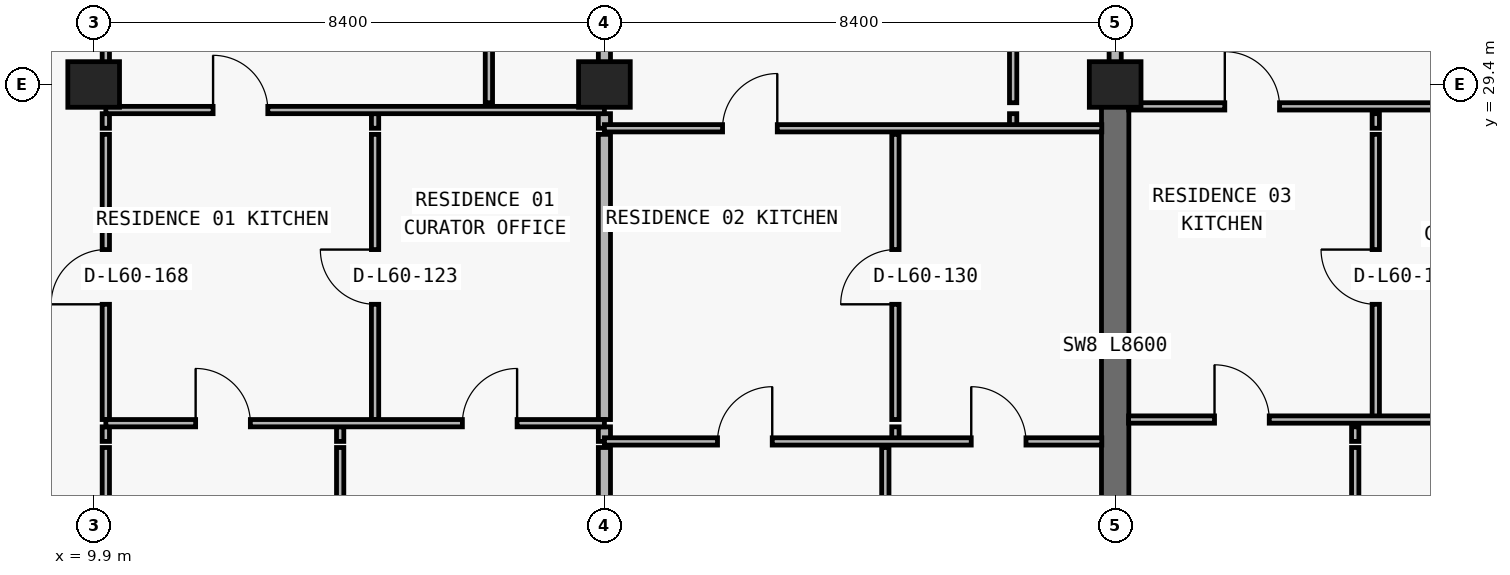
"""IFC4 building model, lengths in metres.
Left out: names, types, materials, properties, quantities, classifications, styles, units other than length and angle.
Written with IfcOpenShell. Run it as: python <this file> out.ifc"""

import sys

from ifc_helpers import new_model, si_unit, direction, frame, frame_2d, origin, origin_2d, place, context, subcontext, project, spatial, rectangle, extrude, element, fill, save


model = new_model("IFC4")
c1 = context("Model", 3, precision=1e-05, world=origin(), true_north=direction((0.0, 1.0)))
c2 = subcontext(c1, "Body", "Model", "MODEL_VIEW")
j1 = project(units=[si_unit("LENGTHUNIT", "METRE"), si_unit("PLANEANGLEUNIT", "RADIAN")], contexts=[c1])
p1 = place(None, origin())
s1 = spatial("IfcSite", under=j1, at=p1, CompositionType="ELEMENT")
p2 = place(p1, origin())
s2 = spatial("IfcBuilding", under=s1, at=p2, CompositionType="ELEMENT")
p3 = place(p2, frame((0.0, 0.0, 214.8)))
s3 = spatial("IfcBuildingStorey", under=s2, at=p3, CompositionType="ELEMENT", Elevation=214.8)
for number, where, z_axis, x_axis in (
    (1, (9.9, 29.4, 0.0), (0.0, 0.0, 1.0), (1.0, 0.0, 0.0)),
    (2, (18.3, 29.4, 0.0), (0.0, 0.0, 1.0), (1.0, 0.0, 0.0)),
    (3, (26.7, 29.4, 0.0), (0.0, 0.0, 1.0), (1.0, 0.0, 0.0)),
):
    element("IfcColumn", number, at=place(p3, frame(where, z_axis=z_axis, x_axis=x_axis)), inside=s3, PredefinedType="COLUMN", context=c2, shape_type="SweptSolid", body=[
        extrude(rectangle(XDim=0.85, YDim=0.75, at=origin_2d()), origin(), (0.0, 0.0, 1.0), 3.05),
    ])
p4 = place(p3, frame((26.7, 20.8, 0.0), z_axis=(0.0, 0.0, 1.0), x_axis=(0.0, 1.0, 0.0)))
e4 = element("IfcWall", 4, at=p4, inside=s3, PredefinedType="SHEAR", context=c2, shape_type="SweptSolid", body=[
    extrude(rectangle(XDim=8.6, YDim=0.45, at=frame_2d((4.3, 0.0))), origin(), (0.0, 0.0, 1.0), 3.05),
])
p5 = place(p3, frame((10.1, 11.285, 0.0), z_axis=(0.0, 0.0, 1.0), x_axis=(0.0, 1.0, 0.0)))
e5 = element("IfcWall", 5, at=p5, inside=s3, PredefinedType="PARTITIONING", context=c2, shape_type="SweptSolid", body=[
    extrude(rectangle(XDim=12.145, YDim=0.12, at=frame_2d((6.073, 0.0))), origin(), (0.0, 0.0, 1.0), 2.263),
])
p6 = place(p3, frame((10.1, 23.53, 0.0), z_axis=(0.0, 0.0, 1.0), x_axis=(0.0, 1.0, 0.0)))
e6 = element("IfcWall", 6, at=p6, inside=s3, PredefinedType="PARTITIONING", context=c2, shape_type="SweptSolid", body=[
    extrude(rectangle(XDim=0.24, YDim=0.12, at=frame_2d((0.12, 0.0))), origin(), (0.0, 0.0, 1.0), 2.263),
])
p7 = place(p3, frame((10.1, 23.89, 0.0), z_axis=(0.0, 0.0, 1.0), x_axis=(0.0, 1.0, 0.0)))
e7 = element("IfcWall", 7, at=p7, inside=s3, PredefinedType="PARTITIONING", context=c2, shape_type="SweptSolid", body=[
    extrude(rectangle(XDim=4.69, YDim=0.12, at=frame_2d((2.345, 0.0))), origin(), (0.0, 0.0, 1.0), 2.263),
])
p8 = place(p7, frame((1.895, 0.0, 0.0)))
e8 = element("IfcOpeningElement", 8, at=p8, cuts=e7, PredefinedType="OPENING", context=c2, shape_type="SweptSolid", body=[
    extrude(rectangle(XDim=0.9, YDim=2.15, at=frame_2d((0.45, 1.075))), frame((0.0, 0.07, 0.0), z_axis=(0.0, -1.0, 0.0), x_axis=(1.0, 0.0, 0.0)), (0.0, 0.0, 1.0), 0.14),
])
p9 = place(p3, frame((10.1, 28.68, 0.0), z_axis=(0.0, 0.0, 1.0), x_axis=(0.0, 1.0, 0.0)))
e9 = element("IfcWall", 9, at=p9, inside=s3, PredefinedType="PARTITIONING", context=c2, shape_type="SweptSolid", body=[
    extrude(rectangle(XDim=0.24, YDim=0.12, at=frame_2d((0.12, 0.0))), origin(), (0.0, 0.0, 1.0), 2.263),
])
p10 = place(p3, frame((10.1, 29.1, 0.0), z_axis=(0.0, 0.0, 1.0), x_axis=(0.0, 1.0, 0.0)))
e10 = element("IfcWall", 10, at=p10, inside=s3, PredefinedType="PARTITIONING", context=c2, shape_type="SweptSolid", body=[
    extrude(rectangle(XDim=5.3, YDim=0.12, at=frame_2d((2.65, 0.0))), origin(), (0.0, 0.0, 1.0), 2.263),
])
p11 = place(p3, frame((13.954, 11.24, 0.0), z_axis=(0.0, 0.0, 1.0), x_axis=(0.0, 1.0, 0.0)))
e11 = element("IfcWall", 11, at=p11, inside=s3, PredefinedType="PARTITIONING", context=c2, shape_type="SweptSolid", body=[
    extrude(rectangle(XDim=12.19, YDim=0.12, at=frame_2d((6.095, 0.0))), origin(), (0.0, 0.0, 1.0), 3.05),
])
p12 = place(p3, frame((13.954, 23.53, 0.0), z_axis=(0.0, 0.0, 1.0), x_axis=(0.0, 1.0, 0.0)))
e12 = element("IfcWall", 12, at=p12, inside=s3, PredefinedType="PARTITIONING", context=c2, shape_type="SweptSolid", body=[
    extrude(rectangle(XDim=0.24, YDim=0.12, at=frame_2d((0.12, 0.0))), origin(), (0.0, 0.0, 1.0), 3.05),
])
p13 = place(p3, frame((14.528, 23.89, 0.0), z_axis=(0.0, 0.0, 1.0), x_axis=(0.0, 1.0, 0.0)))
e13 = element("IfcWall", 13, at=p13, inside=s3, PredefinedType="PARTITIONING", context=c2, shape_type="SweptSolid", body=[
    extrude(rectangle(XDim=4.69, YDim=0.12, at=frame_2d((2.345, 0.0))), origin(), (0.0, 0.0, 1.0), 3.05),
])
p14 = place(p13, frame((1.895, 0.0, 0.0)))
e14 = element("IfcOpeningElement", 14, at=p14, cuts=e13, PredefinedType="OPENING", context=c2, shape_type="SweptSolid", body=[
    extrude(rectangle(XDim=0.9, YDim=2.15, at=frame_2d((0.45, 1.075))), frame((0.0, 0.07, 0.0), z_axis=(0.0, -1.0, 0.0), x_axis=(1.0, 0.0, 0.0)), (0.0, 0.0, 1.0), 0.14),
])
p15 = place(p3, frame((14.528, 28.68, 0.0), z_axis=(0.0, 0.0, 1.0), x_axis=(0.0, 1.0, 0.0)))
e15 = element("IfcWall", 15, at=p15, inside=s3, PredefinedType="PARTITIONING", context=c2, shape_type="SweptSolid", body=[
    extrude(rectangle(XDim=0.24, YDim=0.12, at=frame_2d((0.12, 0.0))), origin(), (0.0, 0.0, 1.0), 3.05),
])
p16 = place(p3, frame((16.4, 29.1, 0.0), z_axis=(0.0, 0.0, 1.0), x_axis=(0.0, 1.0, 0.0)))
e16 = element("IfcWall", 16, at=p16, inside=s3, PredefinedType="PARTITIONING", context=c2, shape_type="SweptSolid", body=[
    extrude(rectangle(XDim=5.3, YDim=0.12, at=frame_2d((2.65, 0.0))), origin(), (0.0, 0.0, 1.0), 3.05),
])
p17 = place(p16, frame((2.225, 0.0, 0.0)))
e17 = element("IfcOpeningElement", 17, at=p17, cuts=e16, PredefinedType="OPENING", context=c2, shape_type="SweptSolid", body=[
    extrude(rectangle(XDim=0.85, YDim=2.1, at=frame_2d((0.425, 1.05))), frame((0.0, 0.07, 0.0), z_axis=(0.0, -1.0, 0.0), x_axis=(1.0, 0.0, 0.0)), (0.0, 0.0, 1.0), 0.14),
])
p18 = place(p3, frame((18.3, 11.24, 0.0), z_axis=(0.0, 0.0, 1.0), x_axis=(0.0, 1.0, 0.0)))
e18 = element("IfcWall", 18, at=p18, inside=s3, PredefinedType="PARTITIONING", context=c2, shape_type="SweptSolid", body=[
    extrude(rectangle(XDim=12.19, YDim=0.2, at=frame_2d((6.095, 0.0))), origin(), (0.0, 0.0, 1.0), 2.263),
])
p19 = place(p3, frame((18.3, 23.53, 0.0), z_axis=(0.0, 0.0, 1.0), x_axis=(0.0, 1.0, 0.0)))
e19 = element("IfcWall", 19, at=p19, inside=s3, PredefinedType="PARTITIONING", context=c2, shape_type="SweptSolid", body=[
    extrude(rectangle(XDim=0.24, YDim=0.2, at=frame_2d((0.12, 0.0))), origin(), (0.0, 0.0, 1.0), 2.263),
])
p20 = place(p3, frame((18.3, 23.89, 0.0), z_axis=(0.0, 0.0, 1.0), x_axis=(0.0, 1.0, 0.0)))
e20 = element("IfcWall", 20, at=p20, inside=s3, PredefinedType="PARTITIONING", context=c2, shape_type="SweptSolid", body=[
    extrude(rectangle(XDim=4.69, YDim=0.2, at=frame_2d((2.345, 0.0))), origin(), (0.0, 0.0, 1.0), 2.263),
])
p21 = place(p3, frame((18.3, 28.68, 0.0), z_axis=(0.0, 0.0, 1.0), x_axis=(0.0, 1.0, 0.0)))
e21 = element("IfcWall", 21, at=p21, inside=s3, PredefinedType="PARTITIONING", context=c2, shape_type="SweptSolid", body=[
    extrude(rectangle(XDim=0.24, YDim=0.2, at=frame_2d((0.12, 0.0))), origin(), (0.0, 0.0, 1.0), 2.263),
])
p22 = place(p3, frame((18.3, 29.1, 0.0), z_axis=(0.0, 0.0, 1.0), x_axis=(0.0, 1.0, 0.0)))
e22 = element("IfcWall", 22, at=p22, inside=s3, PredefinedType="PARTITIONING", context=c2, shape_type="SweptSolid", body=[
    extrude(rectangle(XDim=5.3, YDim=0.2, at=frame_2d((2.65, 0.0))), origin(), (0.0, 0.0, 1.0), 2.263),
])
p23 = place(p3, frame((22.92, 11.24, 0.0), z_axis=(0.0, 0.0, 1.0), x_axis=(0.0, 1.0, 0.0)))
e23 = element("IfcWall", 23, at=p23, inside=s3, PredefinedType="PARTITIONING", context=c2, shape_type="SweptSolid", body=[
    extrude(rectangle(XDim=12.19, YDim=0.12, at=frame_2d((6.095, 0.0))), origin(), (0.0, 0.0, 1.0), 3.05),
])
p24 = place(p3, frame((23.086, 23.53, 0.0), z_axis=(0.0, 0.0, 1.0), x_axis=(0.0, 1.0, 0.0)))
e24 = element("IfcWall", 24, at=p24, inside=s3, PredefinedType="PARTITIONING", context=c2, shape_type="SweptSolid", body=[
    extrude(rectangle(XDim=0.24, YDim=0.12, at=frame_2d((0.12, 0.0))), origin(), (0.0, 0.0, 1.0), 3.05),
])
p25 = place(p3, frame((23.086, 23.89, 0.0), z_axis=(0.0, 0.0, 1.0), x_axis=(0.0, 1.0, 0.0)))
e25 = element("IfcWall", 25, at=p25, inside=s3, PredefinedType="PARTITIONING", context=c2, shape_type="SweptSolid", body=[
    extrude(rectangle(XDim=4.69, YDim=0.12, at=frame_2d((2.345, 0.0))), origin(), (0.0, 0.0, 1.0), 3.05),
])
p26 = place(p25, frame((1.895, 0.0, 0.0)))
e26 = element("IfcOpeningElement", 26, at=p26, cuts=e25, PredefinedType="OPENING", context=c2, shape_type="SweptSolid", body=[
    extrude(rectangle(XDim=0.9, YDim=2.15, at=frame_2d((0.45, 1.075))), frame((0.0, 0.07, 0.0), z_axis=(0.0, -1.0, 0.0), x_axis=(1.0, 0.0, 0.0)), (0.0, 0.0, 1.0), 0.14),
])
p27 = place(p3, frame((25.022, 28.68, 0.0), z_axis=(0.0, 0.0, 1.0), x_axis=(0.0, 1.0, 0.0)))
e27 = element("IfcWall", 27, at=p27, inside=s3, PredefinedType="PARTITIONING", context=c2, shape_type="SweptSolid", body=[
    extrude(rectangle(XDim=0.24, YDim=0.12, at=frame_2d((0.12, 0.0))), origin(), (0.0, 0.0, 1.0), 3.05),
])
p28 = place(p3, frame((25.022, 29.1, 0.0), z_axis=(0.0, 0.0, 1.0), x_axis=(0.0, 1.0, 0.0)))
e28 = element("IfcWall", 28, at=p28, inside=s3, PredefinedType="PARTITIONING", context=c2, shape_type="SweptSolid", body=[
    extrude(rectangle(XDim=5.3, YDim=0.12, at=frame_2d((2.65, 0.0))), origin(), (0.0, 0.0, 1.0), 3.05),
])
p29 = place(p28, frame((2.225, 0.0, 0.0)))
e29 = element("IfcOpeningElement", 29, at=p29, cuts=e28, PredefinedType="OPENING", context=c2, shape_type="SweptSolid", body=[
    extrude(rectangle(XDim=0.85, YDim=2.1, at=frame_2d((0.425, 1.05))), frame((0.0, 0.07, 0.0), z_axis=(0.0, -1.0, 0.0), x_axis=(1.0, 0.0, 0.0)), (0.0, 0.0, 1.0), 0.14),
])
p30 = place(p3, frame((26.7, 29.405, 0.0), z_axis=(0.0, 0.0, 1.0), x_axis=(0.0, 1.0, 0.0)))
e30 = element("IfcWall", 30, at=p30, inside=s3, PredefinedType="PARTITIONING", context=c2, shape_type="SweptSolid", body=[
    extrude(rectangle(XDim=4.995, YDim=0.2, at=frame_2d((2.498, 0.0))), origin(), (0.0, 0.0, 1.0), 2.335),
])
p31 = place(p3, frame((30.648, 11.24, 0.0), z_axis=(0.0, 0.0, 1.0), x_axis=(0.0, 1.0, 0.0)))
e31 = element("IfcWall", 31, at=p31, inside=s3, PredefinedType="PARTITIONING", context=c2, shape_type="SweptSolid", body=[
    extrude(rectangle(XDim=12.19, YDim=0.12, at=frame_2d((6.095, 0.0))), origin(), (0.0, 0.0, 1.0), 3.05),
])
p32 = place(p3, frame((30.648, 23.53, 0.0), z_axis=(0.0, 0.0, 1.0), x_axis=(0.0, 1.0, 0.0)))
e32 = element("IfcWall", 32, at=p32, inside=s3, PredefinedType="PARTITIONING", context=c2, shape_type="SweptSolid", body=[
    extrude(rectangle(XDim=0.24, YDim=0.12, at=frame_2d((0.12, 0.0))), origin(), (0.0, 0.0, 1.0), 3.05),
])
p33 = place(p3, frame((30.986, 23.89, 0.0), z_axis=(0.0, 0.0, 1.0), x_axis=(0.0, 1.0, 0.0)))
e33 = element("IfcWall", 33, at=p33, inside=s3, PredefinedType="PARTITIONING", context=c2, shape_type="SweptSolid", body=[
    extrude(rectangle(XDim=4.69, YDim=0.12, at=frame_2d((2.345, 0.0))), origin(), (0.0, 0.0, 1.0), 3.05),
])
p34 = place(p33, frame((1.895, 0.0, 0.0)))
e34 = element("IfcOpeningElement", 34, at=p34, cuts=e33, PredefinedType="OPENING", context=c2, shape_type="SweptSolid", body=[
    extrude(rectangle(XDim=0.9, YDim=2.15, at=frame_2d((0.45, 1.075))), frame((0.0, 0.07, 0.0), z_axis=(0.0, -1.0, 0.0), x_axis=(1.0, 0.0, 0.0)), (0.0, 0.0, 1.0), 0.14),
])
p35 = place(p3, frame((30.986, 28.68, 0.0), z_axis=(0.0, 0.0, 1.0), x_axis=(0.0, 1.0, 0.0)))
e35 = element("IfcWall", 35, at=p35, inside=s3, PredefinedType="PARTITIONING", context=c2, shape_type="SweptSolid", body=[
    extrude(rectangle(XDim=0.24, YDim=0.12, at=frame_2d((0.12, 0.0))), origin(), (0.0, 0.0, 1.0), 3.05),
])
p36 = place(p3, frame((18.3, 23.53, 0.0), z_axis=(0.0, 0.0, 1.0), x_axis=(1.0, 0.0, 0.0)))
e36 = element("IfcWall", 36, at=p36, inside=s3, PredefinedType="PARTITIONING", context=c2, shape_type="SweptSolid", body=[
    extrude(rectangle(XDim=8.18, YDim=0.12, at=frame_2d((4.09, 0.0))), origin(), (0.0, 0.0, 1.0), 3.05),
])
p37 = place(p36, frame((1.86, 0.0, 0.0)))
e37 = element("IfcOpeningElement", 37, at=p37, cuts=e36, PredefinedType="OPENING", context=c2, shape_type="SweptSolid", body=[
    extrude(rectangle(XDim=0.9, YDim=2.15, at=frame_2d((0.45, 1.075))), frame((0.0, 0.07, 0.0), z_axis=(0.0, -1.0, 0.0), x_axis=(1.0, 0.0, 0.0)), (0.0, 0.0, 1.0), 0.14),
])
p38 = place(p36, frame((6.033, 0.0, 0.0)))
e38 = element("IfcOpeningElement", 38, at=p38, cuts=e36, PredefinedType="OPENING", context=c2, shape_type="SweptSolid", body=[
    extrude(rectangle(XDim=0.9, YDim=2.15, at=frame_2d((0.45, 1.075))), frame((0.0, 0.07, 0.0), z_axis=(0.0, -1.0, 0.0), x_axis=(1.0, 0.0, 0.0)), (0.0, 0.0, 1.0), 0.14),
])
p39 = place(p3, frame((10.1, 23.83, 0.0), z_axis=(0.0, 0.0, 1.0), x_axis=(1.0, 0.0, 0.0)))
e39 = element("IfcWall", 39, at=p39, inside=s3, PredefinedType="PARTITIONING", context=c2, shape_type="SweptSolid", body=[
    extrude(rectangle(XDim=8.2, YDim=0.12, at=frame_2d((4.1, 0.0))), origin(), (0.0, 0.0, 1.0), 3.05),
])
p40 = place(p39, frame((1.477, 0.0, 0.0)))
e40 = element("IfcOpeningElement", 40, at=p40, cuts=e39, PredefinedType="OPENING", context=c2, shape_type="SweptSolid", body=[
    extrude(rectangle(XDim=0.9, YDim=2.15, at=frame_2d((0.45, 1.075))), frame((0.0, 0.07, 0.0), z_axis=(0.0, -1.0, 0.0), x_axis=(1.0, 0.0, 0.0)), (0.0, 0.0, 1.0), 0.14),
])
p41 = place(p39, frame((5.864, 0.0, 0.0)))
e41 = element("IfcOpeningElement", 41, at=p41, cuts=e39, PredefinedType="OPENING", context=c2, shape_type="SweptSolid", body=[
    extrude(rectangle(XDim=0.9, YDim=2.15, at=frame_2d((0.45, 1.075))), frame((0.0, 0.07, 0.0), z_axis=(0.0, -1.0, 0.0), x_axis=(1.0, 0.0, 0.0)), (0.0, 0.0, 1.0), 0.14),
])
p42 = place(p3, frame((26.92, 23.89, 0.0), z_axis=(0.0, 0.0, 1.0), x_axis=(1.0, 0.0, 0.0)))
e42 = element("IfcWall", 42, at=p42, inside=s3, PredefinedType="PARTITIONING", context=c2, shape_type="SweptSolid", body=[
    extrude(rectangle(XDim=8.18, YDim=0.12, at=frame_2d((4.09, 0.0))), origin(), (0.0, 0.0, 1.0), 3.05),
])
p43 = place(p42, frame((1.414, 0.0, 0.0)))
e43 = element("IfcOpeningElement", 43, at=p43, cuts=e42, PredefinedType="OPENING", context=c2, shape_type="SweptSolid", body=[
    extrude(rectangle(XDim=0.9, YDim=2.15, at=frame_2d((0.45, 1.075))), frame((0.0, 0.07, 0.0), z_axis=(0.0, -1.0, 0.0), x_axis=(1.0, 0.0, 0.0)), (0.0, 0.0, 1.0), 0.14),
])
p44 = place(p42, frame((5.673, 0.0, 0.0)))
e44 = element("IfcOpeningElement", 44, at=p44, cuts=e42, PredefinedType="OPENING", context=c2, shape_type="SweptSolid", body=[
    extrude(rectangle(XDim=0.9, YDim=2.15, at=frame_2d((0.45, 1.075))), frame((0.0, 0.07, 0.0), z_axis=(0.0, -1.0, 0.0), x_axis=(1.0, 0.0, 0.0)), (0.0, 0.0, 1.0), 0.14),
])
p45 = place(p3, frame((18.3, 28.68, 0.0), z_axis=(0.0, 0.0, 1.0), x_axis=(1.0, 0.0, 0.0)))
e45 = element("IfcWall", 45, at=p45, inside=s3, PredefinedType="PARTITIONING", context=c2, shape_type="SweptSolid", body=[
    extrude(rectangle(XDim=8.18, YDim=0.12, at=frame_2d((4.09, 0.0))), origin(), (0.0, 0.0, 1.0), 3.05),
])
p46 = place(p45, frame((1.943, 0.0, 0.0)))
e46 = element("IfcOpeningElement", 46, at=p46, cuts=e45, PredefinedType="OPENING", context=c2, shape_type="SweptSolid", body=[
    extrude(rectangle(XDim=0.9, YDim=2.15, at=frame_2d((0.45, 1.075))), frame((0.0, 0.07, 0.0), z_axis=(0.0, -1.0, 0.0), x_axis=(1.0, 0.0, 0.0)), (0.0, 0.0, 1.0), 0.14),
])
p47 = place(p3, frame((10.1, 28.98, 0.0), z_axis=(0.0, 0.0, 1.0), x_axis=(1.0, 0.0, 0.0)))
e47 = element("IfcWall", 47, at=p47, inside=s3, PredefinedType="PARTITIONING", context=c2, shape_type="SweptSolid", body=[
    extrude(rectangle(XDim=8.2, YDim=0.12, at=frame_2d((4.1, 0.0))), origin(), (0.0, 0.0, 1.0), 3.05),
])
p48 = place(p47, frame((1.764, 0.0, 0.0)))
e48 = element("IfcOpeningElement", 48, at=p48, cuts=e47, PredefinedType="OPENING", context=c2, shape_type="SweptSolid", body=[
    extrude(rectangle(XDim=0.9, YDim=2.15, at=frame_2d((0.45, 1.075))), frame((0.0, 0.07, 0.0), z_axis=(0.0, -1.0, 0.0), x_axis=(1.0, 0.0, 0.0)), (0.0, 0.0, 1.0), 0.14),
])
p49 = place(p3, frame((26.92, 29.04, 0.0), z_axis=(0.0, 0.0, 1.0), x_axis=(1.0, 0.0, 0.0)))
e49 = element("IfcWall", 49, at=p49, inside=s3, PredefinedType="PARTITIONING", context=c2, shape_type="SweptSolid", body=[
    extrude(rectangle(XDim=8.18, YDim=0.12, at=frame_2d((4.09, 0.0))), origin(), (0.0, 0.0, 1.0), 3.05),
])
p50 = place(p49, frame((1.583, 0.0, 0.0)))
e50 = element("IfcOpeningElement", 50, at=p50, cuts=e49, PredefinedType="OPENING", context=c2, shape_type="SweptSolid", body=[
    extrude(rectangle(XDim=0.9, YDim=2.15, at=frame_2d((0.45, 1.075))), frame((0.0, 0.07, 0.0), z_axis=(0.0, -1.0, 0.0), x_axis=(1.0, 0.0, 0.0)), (0.0, 0.0, 1.0), 0.14),
])
p51 = place(p48, origin())
e51 = element("IfcDoor", 51, at=p51, inside=s3, OperationType="SINGLE_SWING_LEFT", PredefinedType="DOOR", context=c2, shape_type="SweptSolid", body=[
    extrude(rectangle(XDim=0.9, YDim=2.15, at=frame_2d((0.45, 1.075))), frame((0.0, 0.025, 0.0), z_axis=(0.0, -1.0, 0.0), x_axis=(1.0, 0.0, 0.0)), (0.0, 0.0, 1.0), 0.05),
])
fill(e48, e51)
p52 = place(p14, origin())
e52 = element("IfcDoor", 52, at=p52, inside=s3, OperationType="SINGLE_SWING_RIGHT", PredefinedType="DOOR", context=c2, shape_type="SweptSolid", body=[
    extrude(rectangle(XDim=0.9, YDim=2.15, at=frame_2d((0.45, 1.075))), frame((0.0, 0.025, 0.0), z_axis=(0.0, -1.0, 0.0), x_axis=(1.0, 0.0, 0.0)), (0.0, 0.0, 1.0), 0.05),
])
fill(e14, e52)
p53 = place(p40, origin())
e53 = element("IfcDoor", 53, at=p53, inside=s3, OperationType="SINGLE_SWING_LEFT", PredefinedType="DOOR", context=c2, shape_type="SweptSolid", body=[
    extrude(rectangle(XDim=0.9, YDim=2.15, at=frame_2d((0.45, 1.075))), frame((0.0, 0.025, 0.0), z_axis=(0.0, -1.0, 0.0), x_axis=(1.0, 0.0, 0.0)), (0.0, 0.0, 1.0), 0.05),
])
fill(e40, e53)
p54 = place(p41, origin())
e54 = element("IfcDoor", 54, at=p54, inside=s3, OperationType="SINGLE_SWING_RIGHT", PredefinedType="DOOR", context=c2, shape_type="SweptSolid", body=[
    extrude(rectangle(XDim=0.9, YDim=2.15, at=frame_2d((0.45, 1.075))), frame((0.0, 0.025, 0.0), z_axis=(0.0, -1.0, 0.0), x_axis=(1.0, 0.0, 0.0)), (0.0, 0.0, 1.0), 0.05),
])
fill(e41, e54)
p55 = place(p46, origin())
e55 = element("IfcDoor", 55, at=p55, inside=s3, OperationType="SINGLE_SWING_RIGHT", PredefinedType="DOOR", context=c2, shape_type="SweptSolid", body=[
    extrude(rectangle(XDim=0.9, YDim=2.15, at=frame_2d((0.45, 1.075))), frame((0.0, 0.025, 0.0), z_axis=(0.0, -1.0, 0.0), x_axis=(1.0, 0.0, 0.0)), (0.0, 0.0, 1.0), 0.05),
])
fill(e46, e55)
p56 = place(p26, origin())
e56 = element("IfcDoor", 56, at=p56, inside=s3, OperationType="SINGLE_SWING_LEFT", PredefinedType="DOOR", context=c2, shape_type="SweptSolid", body=[
    extrude(rectangle(XDim=0.9, YDim=2.15, at=frame_2d((0.45, 1.075))), frame((0.0, 0.025, 0.0), z_axis=(0.0, -1.0, 0.0), x_axis=(1.0, 0.0, 0.0)), (0.0, 0.0, 1.0), 0.05),
])
fill(e26, e56)
p57 = place(p37, origin())
e57 = element("IfcDoor", 57, at=p57, inside=s3, OperationType="SINGLE_SWING_RIGHT", PredefinedType="DOOR", context=c2, shape_type="SweptSolid", body=[
    extrude(rectangle(XDim=0.9, YDim=2.15, at=frame_2d((0.45, 1.075))), frame((0.0, 0.025, 0.0), z_axis=(0.0, -1.0, 0.0), x_axis=(1.0, 0.0, 0.0)), (0.0, 0.0, 1.0), 0.05),
])
fill(e37, e57)
p58 = place(p38, origin())
e58 = element("IfcDoor", 58, at=p58, inside=s3, OperationType="SINGLE_SWING_LEFT", PredefinedType="DOOR", context=c2, shape_type="SweptSolid", body=[
    extrude(rectangle(XDim=0.9, YDim=2.15, at=frame_2d((0.45, 1.075))), frame((0.0, 0.025, 0.0), z_axis=(0.0, -1.0, 0.0), x_axis=(1.0, 0.0, 0.0)), (0.0, 0.0, 1.0), 0.05),
])
fill(e38, e58)
p59 = place(p50, origin())
e59 = element("IfcDoor", 59, at=p59, inside=s3, OperationType="SINGLE_SWING_LEFT", PredefinedType="DOOR", context=c2, shape_type="SweptSolid", body=[
    extrude(rectangle(XDim=0.9, YDim=2.15, at=frame_2d((0.45, 1.075))), frame((0.0, 0.025, 0.0), z_axis=(0.0, -1.0, 0.0), x_axis=(1.0, 0.0, 0.0)), (0.0, 0.0, 1.0), 0.05),
])
fill(e50, e59)
p60 = place(p34, origin())
e60 = element("IfcDoor", 60, at=p60, inside=s3, OperationType="SINGLE_SWING_RIGHT", PredefinedType="DOOR", context=c2, shape_type="SweptSolid", body=[
    extrude(rectangle(XDim=0.9, YDim=2.15, at=frame_2d((0.45, 1.075))), frame((0.0, 0.025, 0.0), z_axis=(0.0, -1.0, 0.0), x_axis=(1.0, 0.0, 0.0)), (0.0, 0.0, 1.0), 0.05),
])
fill(e34, e60)
p61 = place(p43, origin())
e61 = element("IfcDoor", 61, at=p61, inside=s3, OperationType="SINGLE_SWING_LEFT", PredefinedType="DOOR", context=c2, shape_type="SweptSolid", body=[
    extrude(rectangle(XDim=0.9, YDim=2.15, at=frame_2d((0.45, 1.075))), frame((0.0, 0.025, 0.0), z_axis=(0.0, -1.0, 0.0), x_axis=(1.0, 0.0, 0.0)), (0.0, 0.0, 1.0), 0.05),
])
fill(e43, e61)
p62 = place(p8, origin())
e62 = element("IfcDoor", 62, at=p62, inside=s3, OperationType="SINGLE_SWING_LEFT", PredefinedType="DOOR", context=c2, shape_type="SweptSolid", body=[
    extrude(rectangle(XDim=0.9, YDim=2.15, at=frame_2d((0.45, 1.075))), frame((0.0, 0.025, 0.0), z_axis=(0.0, -1.0, 0.0), x_axis=(1.0, 0.0, 0.0)), (0.0, 0.0, 1.0), 0.05),
])
fill(e8, e62)
save(model, sys.argv[1])
